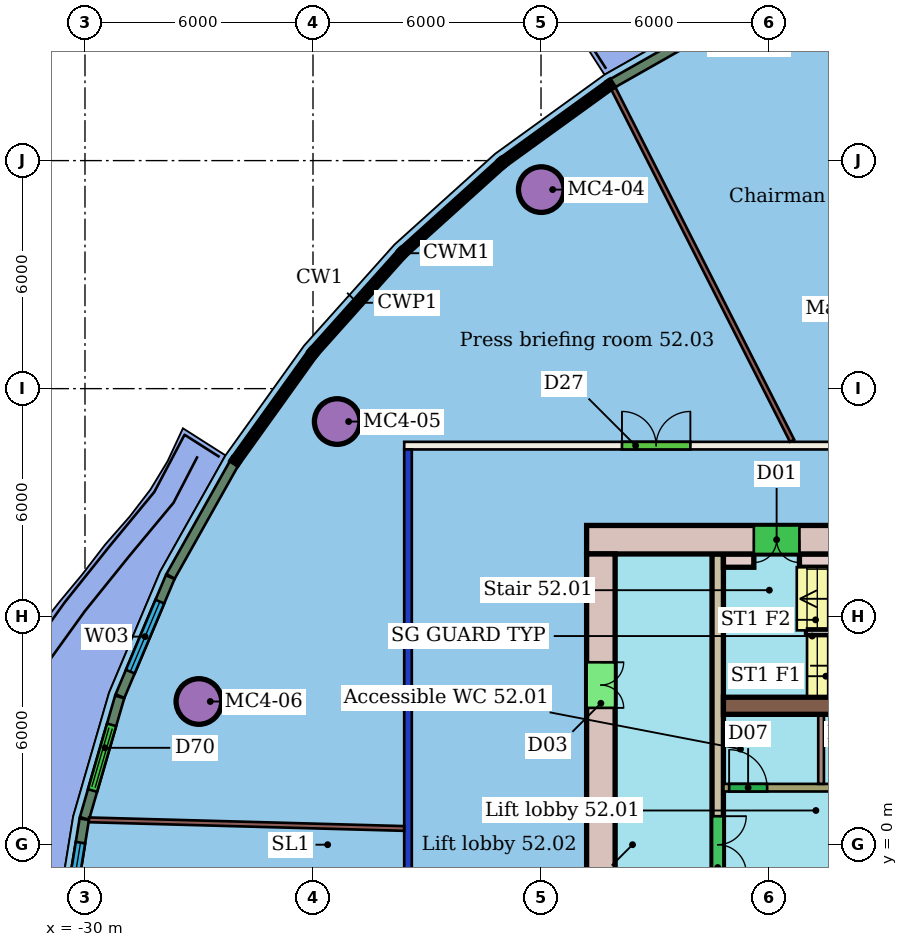
"""IFC4 building model, lengths in metres.
Left out: names, types, materials, properties, quantities, classifications, styles, units other than length and angle.
Written with IfcOpenShell. Run it as: python <this file> out.ifc"""

import sys

from ifc_helpers import new_model, si_unit, direction, frame, frame_2d, origin, origin_2d, place, context, subcontext, project, spatial, rectangle, hollow_circle, extrude, element, fill, save


model = new_model("IFC4")
c1 = context("Model", 3, precision=1e-05, world=origin(), true_north=direction((0.0, 1.0)))
c2 = subcontext(c1, "Body", "Model", "MODEL_VIEW")
j1 = project(units=[si_unit("LENGTHUNIT", "METRE"), si_unit("PLANEANGLEUNIT", "RADIAN")], contexts=[c1])
p1 = place(None, origin())
s1 = spatial("IfcSite", under=j1, at=p1, CompositionType="ELEMENT")
p2 = place(p1, origin())
s2 = spatial("IfcBuilding", under=s1, at=p2, CompositionType="ELEMENT")
p3 = place(p2, frame((0.0, 0.0, 213.7)))
s3 = spatial("IfcBuildingStorey", under=s2, at=p3, CompositionType="ELEMENT", Elevation=213.7)
for number, where, z_axis, x_axis in (
    (1, (-17.993, 17.237, 0.0), (0.0, 0.0, 1.0), (1.0, 0.0, 0.0)),
    (2, (-23.363, 11.134, 0.0), (0.0, 0.0, 1.0), (1.0, 0.0, 0.0)),
    (3, (-27.003, 3.768, 0.0), (0.0, 0.0, 1.0), (1.0, 0.0, 0.0)),
):
    element("IfcColumn", number, at=place(p3, frame(where, z_axis=z_axis, x_axis=x_axis)), inside=s3, PredefinedType="COLUMN", context=c2, shape_type="SweptSolid", body=[
        extrude(hollow_circle(Radius=0.6, WallThickness=0.045, at=origin_2d()), origin(), (0.0, 0.0, 1.0), 3.45),
    ])
p4 = place(p3, frame((-21.5, -10.4, 0.0), z_axis=(0.0, 0.0, 1.0), x_axis=(0.0, 1.0, 0.0)))
e4 = element("IfcWall", 4, at=p4, inside=s3, PredefinedType="PARTITIONING", context=c2, shape_type="SweptSolid", body=[
    extrude(rectangle(XDim=20.8, YDim=0.2, at=frame_2d((10.4, 0.0))), origin(), (0.0, 0.0, 1.0), 3.05),
])
p5 = place(p4, frame((6.094, 0.0, 0.0)))
e5 = element("IfcOpeningElement", 5, at=p5, cuts=e4, PredefinedType="OPENING", context=c2, shape_type="SweptSolid", body=[
    extrude(rectangle(XDim=1.8, YDim=2.1, at=frame_2d((0.9, 1.05))), frame((0.0, 0.11, 0.0), z_axis=(0.0, -1.0, 0.0), x_axis=(1.0, 0.0, 0.0)), (0.0, 0.0, 1.0), 0.22),
])
p6 = place(p3, frame((-21.6, 10.5, 0.0), z_axis=(0.0, 0.0, 1.0), x_axis=(1.0, 0.0, 0.0)))
e6 = element("IfcWall", 6, at=p6, inside=s3, PredefinedType="PARTITIONING", context=c2, shape_type="SweptSolid", body=[
    extrude(rectangle(XDim=31.2, YDim=0.2, at=frame_2d((15.6, 0.0))), origin(), (0.0, 0.0, 1.0), 3.45),
])
p7 = place(p6, frame((18.296, 0.0, 0.0)))
e7 = element("IfcOpeningElement", 7, at=p7, cuts=e6, PredefinedType="OPENING", context=c2, shape_type="SweptSolid", body=[
    extrude(rectangle(XDim=1.0, YDim=2.4, at=frame_2d((0.5, 1.2))), frame((0.0, 0.11, 0.0), z_axis=(0.0, -1.0, 0.0), x_axis=(1.0, 0.0, 0.0)), (0.0, 0.0, 1.0), 0.22),
])
p8 = place(p6, frame((11.6, 0.0, 0.0)))
e8 = element("IfcOpeningElement", 8, at=p8, cuts=e6, PredefinedType="OPENING", context=c2, shape_type="SweptSolid", body=[
    extrude(rectangle(XDim=1.0, YDim=2.4, at=frame_2d((0.5, 1.2))), frame((0.0, 0.11, 0.0), z_axis=(0.0, -1.0, 0.0), x_axis=(1.0, 0.0, 0.0)), (0.0, 0.0, 1.0), 0.22),
])
p9 = place(p6, frame((5.73, 0.0, 0.0)))
e9 = element("IfcOpeningElement", 9, at=p9, cuts=e6, PredefinedType="OPENING", context=c2, shape_type="SweptSolid", body=[
    extrude(rectangle(XDim=1.8, YDim=2.4, at=frame_2d((0.9, 1.2))), frame((0.0, 0.11, 0.0), z_axis=(0.0, -1.0, 0.0), x_axis=(1.0, 0.0, 0.0)), (0.0, 0.0, 1.0), 0.22),
])
p10 = place(p6, frame((23.566, 0.0, 0.0)))
e10 = element("IfcOpeningElement", 10, at=p10, cuts=e6, PredefinedType="OPENING", context=c2, shape_type="SweptSolid", body=[
    extrude(rectangle(XDim=1.8, YDim=2.1, at=frame_2d((0.9, 1.05))), frame((0.0, 0.11, 0.0), z_axis=(0.0, -1.0, 0.0), x_axis=(1.0, 0.0, 0.0)), (0.0, 0.0, 1.0), 0.22),
])
p11 = place(p3, frame((-16.099, 19.903, 0.0), z_axis=(0.0, 0.0, 1.0), x_axis=(0.452483019346, -0.891773018881, 0.0)))
e11 = element("IfcWall", 11, at=p11, inside=s3, PredefinedType="PARTITIONING", context=c2, shape_type="SweptSolid", body=[
    extrude(rectangle(XDim=10.4, YDim=0.125, at=frame_2d((5.2, 0.0))), origin(), (0.0, 0.0, 1.0), 3.45),
])
p12 = place(p3, frame((-29.895, 0.654, 0.0), z_axis=(0.0, 0.0, 1.0), x_axis=(0.999626262379, -0.02733743885, 0.0)))
e12 = element("IfcWall", 12, at=p12, inside=s3, PredefinedType="PARTITIONING", context=c2, shape_type="SweptSolid", body=[
    extrude(rectangle(XDim=8.297, YDim=0.125, at=frame_2d((4.148, 0.0))), origin(), (0.0, 0.0, 1.0), 3.45),
])
for number, where, z_axis, x_axis in (
    (13, (-13.152, 21.719, 0.0), (0.0, 0.0, 1.0), (-0.87, -0.494, 0.0)),
    (14, (-26.077, 10.035, 0.0), (0.0, 0.0, 1.0), (-0.49, -0.872, 0.0)),
):
    element("IfcWall", number, at=place(p3, frame(where, z_axis=z_axis, x_axis=x_axis)), inside=s3, PredefinedType="SOLIDWALL", context=c2, shape_type="SweptSolid", body=[
        extrude(rectangle(XDim=3.412, YDim=0.25, at=frame_2d((1.706, 0.0))), origin(), (0.0, 0.0, 1.0), 3.1),
    ])
p13 = place(p3, frame((-27.758, 7.041, 0.0), z_axis=(0.0, 0.0, 1.0), x_axis=(-0.388763390527, -0.921337628769, 0.0)))
e15 = element("IfcWall", 15, at=p13, inside=s3, PredefinedType="SOLIDWALL", context=c2, shape_type="SweptSolid", body=[
    extrude(rectangle(XDim=3.399, YDim=0.25, at=frame_2d((1.699, 0.0))), origin(), (0.0, 0.0, 1.0), 3.1),
])
p14 = place(p13, frame((0.699, 0.0, 0.9)))
e16 = element("IfcOpeningElement", 16, at=p14, cuts=e15, PredefinedType="OPENING", context=c2, shape_type="SweptSolid", body=[
    extrude(rectangle(XDim=2.0, YDim=2.1, at=frame_2d((1.0, 1.05))), frame((0.0, 0.135, 0.0), z_axis=(0.0, -1.0, 0.0), x_axis=(1.0, 0.0, 0.0)), (0.0, 0.0, 1.0), 0.27),
])
p15 = place(p3, frame((-29.087, 3.888, 0.0), z_axis=(0.0, 0.0, 1.0), x_axis=(-0.278604991916, -0.960405778033, 0.0)))
e17 = element("IfcWall", 17, at=p15, inside=s3, PredefinedType="SOLIDWALL", context=c2, shape_type="SweptSolid", body=[
    extrude(rectangle(XDim=3.327, YDim=0.25, at=frame_2d((1.664, 0.0))), origin(), (0.0, 0.0, 1.0), 3.1),
])
p16 = place(p15, frame((0.764, 0.0, 0.0)))
e18 = element("IfcOpeningElement", 18, at=p16, cuts=e17, PredefinedType="OPENING", context=c2, shape_type="SweptSolid", body=[
    extrude(rectangle(XDim=1.8, YDim=2.4, at=frame_2d((0.9, 1.2))), frame((0.0, 0.135, 0.0), z_axis=(0.0, -1.0, 0.0), x_axis=(1.0, 0.0, 0.0)), (0.0, 0.0, 1.0), 0.27),
])
p17 = place(p3, frame((-30.019, 0.67, 0.0), z_axis=(0.0, 0.0, 1.0), x_axis=(-0.159457089841, -0.987204860452, 0.0)))
e19 = element("IfcWall", 19, at=p17, inside=s3, PredefinedType="SOLIDWALL", context=c2, shape_type="SweptSolid", body=[
    extrude(rectangle(XDim=3.246, YDim=0.25, at=frame_2d((1.623, 0.0))), origin(), (0.0, 0.0, 1.0), 3.1),
])
p18 = place(p17, frame((0.623, 0.0, 0.9)))
e20 = element("IfcOpeningElement", 20, at=p18, cuts=e19, PredefinedType="OPENING", context=c2, shape_type="SweptSolid", body=[
    extrude(rectangle(XDim=2.0, YDim=2.1, at=frame_2d((1.0, 1.05))), frame((0.0, 0.135, 0.0), z_axis=(0.0, -1.0, 0.0), x_axis=(1.0, 0.0, 0.0)), (0.0, 0.0, 1.0), 0.27),
])
p19 = place(p3, frame((-6.0, 8.025, 0.0), z_axis=(0.0, 0.0, 1.0), x_axis=(-1.0, 0.0, 0.0)))
e21 = element("IfcWall", 21, at=p19, inside=s3, PredefinedType="SHEAR", context=c2, shape_type="SweptSolid", body=[
    extrude(rectangle(XDim=10.8, YDim=0.75, at=frame_2d((5.4, 0.0))), origin(), (0.0, 0.0, 1.0), 3.3),
])
p20 = place(p19, frame((5.2, 0.0, 0.0)))
e22 = element("IfcOpeningElement", 22, at=p20, cuts=e21, PredefinedType="OPENING", context=c2, shape_type="SweptSolid", body=[
    extrude(rectangle(XDim=1.2, YDim=2.1, at=frame_2d((0.6, 1.05))), frame((0.0, 0.385, 0.0), z_axis=(0.0, -1.0, 0.0), x_axis=(1.0, 0.0, 0.0)), (0.0, 0.0, 1.0), 0.77),
])
p21 = place(p3, frame((-16.425, 7.65, 0.0), z_axis=(0.0, 0.0, 1.0), x_axis=(0.0, -1.0, 0.0)))
e23 = element("IfcWall", 23, at=p21, inside=s3, PredefinedType="SHEAR", context=c2, shape_type="SweptSolid", body=[
    extrude(rectangle(XDim=15.3, YDim=0.75, at=frame_2d((7.65, 0.0))), origin(), (0.0, 0.0, 1.0), 3.3),
])
p22 = place(p21, frame((11.25, 0.0, 0.0)))
e24 = element("IfcOpeningElement", 24, at=p22, cuts=e23, PredefinedType="OPENING", context=c2, shape_type="SweptSolid", body=[
    extrude(rectangle(XDim=1.2, YDim=2.1, at=frame_2d((0.6, 1.05))), frame((0.0, 0.385, 0.0), z_axis=(0.0, -1.0, 0.0), x_axis=(1.0, 0.0, 0.0)), (0.0, 0.0, 1.0), 0.77),
])
p23 = place(p21, frame((2.85, 0.0, 0.0)))
e25 = element("IfcOpeningElement", 25, at=p23, cuts=e23, PredefinedType="OPENING", context=c2, shape_type="SweptSolid", body=[
    extrude(rectangle(XDim=1.2, YDim=2.1, at=frame_2d((0.6, 1.05))), frame((0.0, 0.385, 0.0), z_axis=(0.0, -1.0, 0.0), x_axis=(1.0, 0.0, 0.0)), (0.0, 0.0, 1.0), 0.77),
])
p24 = place(p3, frame((-13.2, 3.655, 0.0), z_axis=(0.0, 0.0, 1.0), x_axis=(1.0, 0.0, 0.0)))
e26 = element("IfcWall", 26, at=p24, inside=s3, PredefinedType="SHEAR", context=c2, shape_type="SweptSolid", body=[
    extrude(rectangle(XDim=7.2, YDim=0.45, at=frame_2d((3.6, 0.0))), origin(), (0.0, 0.0, 1.0), 3.3),
])
p25 = place(p3, frame((-13.35, 7.65, 0.0), z_axis=(0.0, 0.0, 1.0), x_axis=(0.0, -1.0, 0.0)))
e27 = element("IfcWall", 27, at=p25, inside=s3, PredefinedType="SHEAR", context=c2, shape_type="SweptSolid", body=[
    extrude(rectangle(XDim=15.3, YDim=0.3, at=frame_2d((7.65, 0.0))), origin(), (0.0, 0.0, 1.0), 3.3),
])
p26 = place(p25, frame((6.9, 0.0, 0.0)))
e28 = element("IfcOpeningElement", 28, at=p26, cuts=e27, PredefinedType="OPENING", context=c2, shape_type="SweptSolid", body=[
    extrude(rectangle(XDim=1.5, YDim=2.1, at=frame_2d((0.75, 1.05))), frame((0.0, 0.16, 0.0), z_axis=(0.0, -1.0, 0.0), x_axis=(1.0, 0.0, 0.0)), (0.0, 0.0, 1.0), 0.32),
])
p27 = place(p3, frame((-13.2, 1.5, 0.0), z_axis=(0.0, 0.0, 1.0), x_axis=(1.0, 0.0, 0.0)))
e29 = element("IfcWall", 29, at=p27, inside=s3, PredefinedType="SHEAR", context=c2, shape_type="SweptSolid", body=[
    extrude(rectangle(XDim=14.4, YDim=0.2, at=frame_2d((7.2, 0.0))), origin(), (0.0, 0.0, 1.0), 3.3),
])
p28 = place(p27, frame((10.312, 0.0, 0.0)))
e30 = element("IfcOpeningElement", 30, at=p28, cuts=e29, PredefinedType="OPENING", context=c2, shape_type="SweptSolid", body=[
    extrude(rectangle(XDim=1.1, YDim=2.1, at=frame_2d((0.55, 1.05))), frame((0.0, 0.11, 0.0), z_axis=(0.0, -1.0, 0.0), x_axis=(1.0, 0.0, 0.0)), (0.0, 0.0, 1.0), 0.22),
])
p29 = place(p27, frame((12.754, 0.0, 0.0)))
e31 = element("IfcOpeningElement", 31, at=p29, cuts=e29, PredefinedType="OPENING", context=c2, shape_type="SweptSolid", body=[
    extrude(rectangle(XDim=1.1, YDim=2.1, at=frame_2d((0.55, 1.05))), frame((0.0, 0.11, 0.0), z_axis=(0.0, -1.0, 0.0), x_axis=(1.0, 0.0, 0.0)), (0.0, 0.0, 1.0), 0.22),
])
p30 = place(p27, frame((0.15, 0.0, 0.0)))
e32 = element("IfcOpeningElement", 32, at=p30, cuts=e29, PredefinedType="OPENING", context=c2, shape_type="SweptSolid", body=[
    extrude(rectangle(XDim=1.0, YDim=2.1, at=frame_2d((0.5, 1.05))), frame((0.0, 0.11, 0.0), z_axis=(0.0, -1.0, 0.0), x_axis=(1.0, 0.0, 0.0)), (0.0, 0.0, 1.0), 0.22),
])
p31 = place(p27, frame((2.794, 0.0, 0.0)))
e33 = element("IfcOpeningElement", 33, at=p31, cuts=e29, PredefinedType="OPENING", context=c2, shape_type="SweptSolid", body=[
    extrude(rectangle(XDim=0.9, YDim=2.1, at=frame_2d((0.45, 1.05))), frame((0.0, 0.11, 0.0), z_axis=(0.0, -1.0, 0.0), x_axis=(1.0, 0.0, 0.0)), (0.0, 0.0, 1.0), 0.22),
])
p32 = place(p27, frame((8.467, 0.0, 0.0)))
e34 = element("IfcOpeningElement", 34, at=p32, cuts=e29, PredefinedType="OPENING", context=c2, shape_type="SweptSolid", body=[
    extrude(rectangle(XDim=0.9, YDim=2.1, at=frame_2d((0.45, 1.05))), frame((0.0, 0.11, 0.0), z_axis=(0.0, -1.0, 0.0), x_axis=(1.0, 0.0, 0.0)), (0.0, 0.0, 1.0), 0.22),
])
p33 = place(p3, frame((-13.2, 7.475, 0.0), z_axis=(0.0, 0.0, 1.0), x_axis=(1.0, 0.0, 0.0)))
e35 = element("IfcWall", 35, at=p33, inside=s3, PredefinedType="SHEAR", context=c2, shape_type="SweptSolid", body=[
    extrude(rectangle(XDim=0.8, YDim=0.35, at=frame_2d((0.4, 0.0))), origin(), (0.0, 0.0, 1.0), 3.3),
])
p34 = place(p3, frame((-11.2, 7.475, 0.0), z_axis=(0.0, 0.0, 1.0), x_axis=(1.0, 0.0, 0.0)))
e36 = element("IfcWall", 36, at=p34, inside=s3, PredefinedType="SHEAR", context=c2, shape_type="SweptSolid", body=[
    extrude(rectangle(XDim=5.05, YDim=0.35, at=frame_2d((2.525, 0.0))), origin(), (0.0, 0.0, 1.0), 3.3),
])
p35 = place(p3, frame((-10.631, 1.6, 0.0), z_axis=(0.0, 0.0, 1.0), x_axis=(0.0, 1.0, 0.0)))
e37 = element("IfcWall", 37, at=p35, inside=s3, PredefinedType="PARTITIONING", context=c2, shape_type="SweptSolid", body=[
    extrude(rectangle(XDim=1.83, YDim=0.15, at=frame_2d((0.915, 0.0))), origin(), (0.0, 0.0, 1.0), 3.3),
])
p36 = place(p9, origin())
e38 = element("IfcDoor", 38, at=p36, inside=s3, OperationType="DOUBLE_DOOR_SINGLE_SWING", PredefinedType="DOOR", context=c2, shape_type="SweptSolid", body=[
    extrude(rectangle(XDim=1.8, YDim=2.4, at=frame_2d((0.9, 1.2))), frame((0.0, 0.025, 0.0), z_axis=(0.0, -1.0, 0.0), x_axis=(1.0, 0.0, 0.0)), (0.0, 0.0, 1.0), 0.05),
])
fill(e9, e38)
p37 = place(p14, origin())
e39 = element("IfcWindow", 39, at=p37, inside=s3, PartitioningType="SINGLE_PANEL", PredefinedType="WINDOW", context=c2, shape_type="SweptSolid", body=[
    extrude(rectangle(XDim=2.0, YDim=2.1, at=frame_2d((1.0, 1.05))), frame((0.0, 0.03, 0.0), z_axis=(0.0, -1.0, 0.0), x_axis=(1.0, 0.0, 0.0)), (0.0, 0.0, 1.0), 0.06),
])
fill(e16, e39)
p38 = place(p16, origin())
e40 = element("IfcDoor", 40, at=p38, inside=s3, OperationType="DOUBLE_DOOR_SLIDING", PredefinedType="DOOR", context=c2, shape_type="SweptSolid", body=[
    extrude(rectangle(XDim=1.8, YDim=2.4, at=frame_2d((0.9, 1.2))), frame((0.0, 0.025, 0.0), z_axis=(0.0, -1.0, 0.0), x_axis=(1.0, 0.0, 0.0)), (0.0, 0.0, 1.0), 0.05),
])
fill(e18, e40)
p39 = place(p18, origin())
e41 = element("IfcWindow", 41, at=p39, inside=s3, PartitioningType="SINGLE_PANEL", PredefinedType="WINDOW", context=c2, shape_type="SweptSolid", body=[
    extrude(rectangle(XDim=2.0, YDim=2.1, at=frame_2d((1.0, 1.05))), frame((0.0, 0.03, 0.0), z_axis=(0.0, -1.0, 0.0), x_axis=(1.0, 0.0, 0.0)), (0.0, 0.0, 1.0), 0.06),
])
fill(e20, e41)
p40 = place(p20, origin())
e42 = element("IfcDoor", 42, at=p40, inside=s3, OperationType="DOUBLE_DOOR_SINGLE_SWING", PredefinedType="NOTDEFINED", context=c2, shape_type="SweptSolid", body=[
    extrude(rectangle(XDim=1.2, YDim=2.1, at=frame_2d((0.6, 1.05))), frame((0.0, 0.025, 0.0), z_axis=(0.0, -1.0, 0.0), x_axis=(1.0, 0.0, 0.0)), (0.0, 0.0, 1.0), 0.05),
])
fill(e22, e42)
p41 = place(p23, origin())
e43 = element("IfcDoor", 43, at=p41, inside=s3, OperationType="DOUBLE_DOOR_SINGLE_SWING", PredefinedType="NOTDEFINED", context=c2, shape_type="SweptSolid", body=[
    extrude(rectangle(XDim=1.2, YDim=2.1, at=frame_2d((0.6, 1.05))), frame((0.0, 0.025, 0.0), z_axis=(0.0, -1.0, 0.0), x_axis=(1.0, 0.0, 0.0)), (0.0, 0.0, 1.0), 0.05),
])
fill(e25, e43)
p42 = place(p26, origin())
e44 = element("IfcDoor", 44, at=p42, inside=s3, OperationType="DOUBLE_DOOR_SINGLE_SWING", PredefinedType="NOTDEFINED", context=c2, shape_type="SweptSolid", body=[
    extrude(rectangle(XDim=1.5, YDim=2.1, at=frame_2d((0.75, 1.05))), frame((0.0, 0.025, 0.0), z_axis=(0.0, -1.0, 0.0), x_axis=(1.0, 0.0, 0.0)), (0.0, 0.0, 1.0), 0.05),
])
fill(e28, e44)
p43 = place(p30, origin())
e45 = element("IfcDoor", 45, at=p43, inside=s3, OperationType="SINGLE_SWING_LEFT", PredefinedType="NOTDEFINED", context=c2, shape_type="SweptSolid", body=[
    extrude(rectangle(XDim=1.0, YDim=2.1, at=frame_2d((0.5, 1.05))), frame((0.0, 0.025, 0.0), z_axis=(0.0, -1.0, 0.0), x_axis=(1.0, 0.0, 0.0)), (0.0, 0.0, 1.0), 0.05),
])
fill(e32, e45)
save(model, sys.argv[1])
